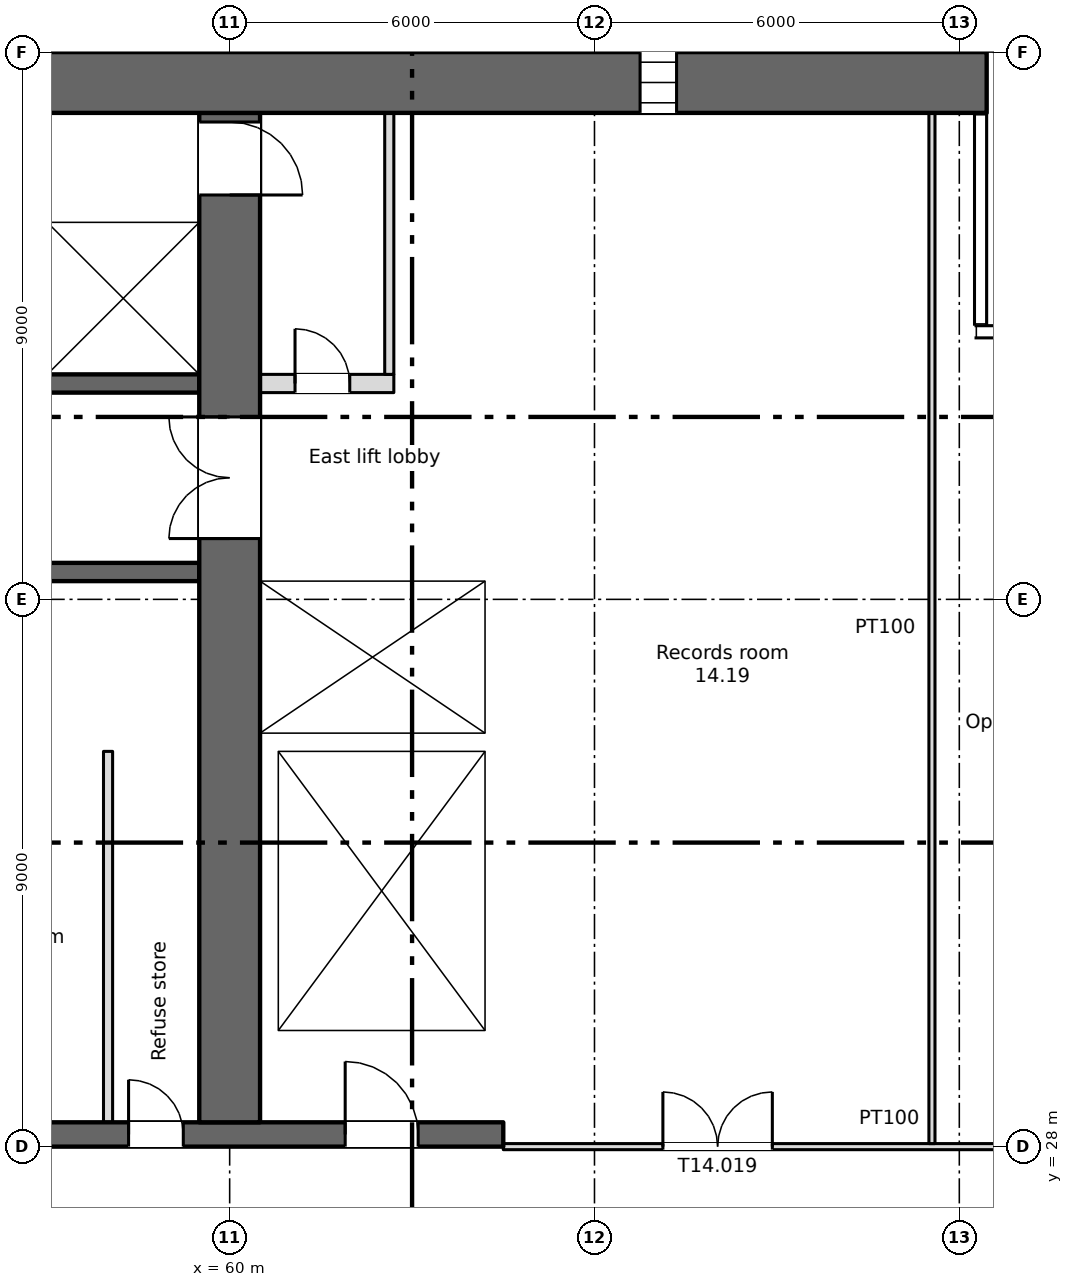
"""IFC4 building model, lengths in metres.
Left out: names, types, materials, properties, quantities, classifications, styles, units other than length and angle.
Written with IfcOpenShell. Run it as: python <this file> out.ifc"""

import sys

from ifc_helpers import new_model, si_unit, direction, frame, frame_2d, origin, place, context, subcontext, project, spatial, rectangle, extrude, element, fill, save


model = new_model("IFC4")
c1 = context("Model", 3, precision=1e-05, world=origin(), true_north=direction((0.0, 1.0)))
c2 = subcontext(c1, "Body", "Model", "MODEL_VIEW")
j1 = project(units=[si_unit("LENGTHUNIT", "METRE"), si_unit("PLANEANGLEUNIT", "RADIAN")], contexts=[c1])
p1 = place(None, origin())
s1 = spatial("IfcSite", under=j1, at=p1, CompositionType="ELEMENT")
p2 = place(p1, origin())
s2 = spatial("IfcBuilding", under=s1, at=p2, CompositionType="ELEMENT")
p3 = place(p2, frame((0.0, 0.0, 78.75)))
s3 = spatial("IfcBuildingStorey", under=s2, at=p3, CompositionType="ELEMENT", Elevation=78.75)
p4 = place(p3, frame((5.55, 45.5, 0.0), z_axis=(0.0, 0.0, 1.0), x_axis=(1.0, 0.0, 0.0)))
e1 = element("IfcWall", 1, at=p4, inside=s3, PredefinedType="SHEAR", context=c2, shape_type="SweptSolid", body=[
    extrude(rectangle(XDim=66.9, YDim=1.0, at=frame_2d((33.45, 0.0))), origin(), (0.0, 0.0, 1.0), 3.35),
])
p5 = place(p4, frame((7.2, 0.0, 0.6)))
e2 = element("IfcOpeningElement", 2, at=p5, cuts=e1, PredefinedType="OPENING", context=c2, shape_type="SweptSolid", body=[
    extrude(rectangle(XDim=0.6, YDim=2.4, at=frame_2d((0.3, 1.2))), frame((0.0, 0.51, 0.0), z_axis=(0.0, -1.0, 0.0), x_axis=(1.0, 0.0, 0.0)), (0.0, 0.0, 1.0), 1.02),
])
p6 = place(p4, frame((61.2, 0.0, 0.6)))
e3 = element("IfcOpeningElement", 3, at=p6, cuts=e1, PredefinedType="OPENING", context=c2, shape_type="SweptSolid", body=[
    extrude(rectangle(XDim=0.6, YDim=2.4, at=frame_2d((0.3, 1.2))), frame((0.0, 0.51, 0.0), z_axis=(0.0, -1.0, 0.0), x_axis=(1.0, 0.0, 0.0)), (0.0, 0.0, 1.0), 1.02),
])
p7 = place(p3, frame((6.7, 28.2, 0.0), z_axis=(0.0, 0.0, 1.0), x_axis=(1.0, 0.0, 0.0)))
e4 = element("IfcWall", 4, at=p7, inside=s3, PredefinedType="SHEAR", context=c2, shape_type="SweptSolid", body=[
    extrude(rectangle(XDim=57.8, YDim=0.4, at=frame_2d((28.9, 0.0))), origin(), (0.0, 0.0, 1.0), 3.35),
])
p8 = place(p7, frame((12.062, 0.0, 0.0)))
e5 = element("IfcOpeningElement", 5, at=p8, cuts=e4, PredefinedType="OPENING", context=c2, shape_type="SweptSolid", body=[
    extrude(rectangle(XDim=0.9, YDim=2.1, at=frame_2d((0.45, 1.05))), frame((0.0, 0.21, 0.0), z_axis=(0.0, -1.0, 0.0), x_axis=(1.0, 0.0, 0.0)), (0.0, 0.0, 1.0), 0.42),
])
p9 = place(p7, frame((14.637, 0.0, 0.0)))
e6 = element("IfcOpeningElement", 6, at=p9, cuts=e4, PredefinedType="OPENING", context=c2, shape_type="SweptSolid", body=[
    extrude(rectangle(XDim=0.9, YDim=2.1, at=frame_2d((0.45, 1.05))), frame((0.0, 0.21, 0.0), z_axis=(0.0, -1.0, 0.0), x_axis=(1.0, 0.0, 0.0)), (0.0, 0.0, 1.0), 0.42),
])
p10 = place(p7, frame((49.062, 0.0, 0.0)))
e7 = element("IfcOpeningElement", 7, at=p10, cuts=e4, PredefinedType="OPENING", context=c2, shape_type="SweptSolid", body=[
    extrude(rectangle(XDim=0.9, YDim=2.1, at=frame_2d((0.45, 1.05))), frame((0.0, 0.21, 0.0), z_axis=(0.0, -1.0, 0.0), x_axis=(1.0, 0.0, 0.0)), (0.0, 0.0, 1.0), 0.42),
])
p11 = place(p7, frame((51.637, 0.0, 0.0)))
e8 = element("IfcOpeningElement", 8, at=p11, cuts=e4, PredefinedType="OPENING", context=c2, shape_type="SweptSolid", body=[
    extrude(rectangle(XDim=0.9, YDim=2.1, at=frame_2d((0.45, 1.05))), frame((0.0, 0.21, 0.0), z_axis=(0.0, -1.0, 0.0), x_axis=(1.0, 0.0, 0.0)), (0.0, 0.0, 1.0), 0.42),
])
p12 = place(p7, frame((1.35, 0.0, 0.0)))
e9 = element("IfcOpeningElement", 9, at=p12, cuts=e4, PredefinedType="OPENING", context=c2, shape_type="SweptSolid", body=[
    extrude(rectangle(XDim=0.9, YDim=2.1, at=frame_2d((0.45, 1.05))), frame((0.0, 0.21, 0.0), z_axis=(0.0, -1.0, 0.0), x_axis=(1.0, 0.0, 0.0)), (0.0, 0.0, 1.0), 0.42),
])
p13 = place(p7, frame((4.7, 0.0, 0.0)))
e10 = element("IfcOpeningElement", 10, at=p13, cuts=e4, PredefinedType="OPENING", context=c2, shape_type="SweptSolid", body=[
    extrude(rectangle(XDim=1.2, YDim=2.1, at=frame_2d((0.6, 1.05))), frame((0.0, 0.21, 0.0), z_axis=(0.0, -1.0, 0.0), x_axis=(1.0, 0.0, 0.0)), (0.0, 0.0, 1.0), 0.42),
])
p14 = place(p7, frame((31.7, 0.0, 0.0)))
e11 = element("IfcOpeningElement", 11, at=p14, cuts=e4, PredefinedType="OPENING", context=c2, shape_type="SweptSolid", body=[
    extrude(rectangle(XDim=1.2, YDim=2.1, at=frame_2d((0.6, 1.05))), frame((0.0, 0.21, 0.0), z_axis=(0.0, -1.0, 0.0), x_axis=(1.0, 0.0, 0.0)), (0.0, 0.0, 1.0), 0.42),
])
p15 = place(p7, frame((55.2, 0.0, 0.0)))
e12 = element("IfcOpeningElement", 12, at=p15, cuts=e4, PredefinedType="OPENING", context=c2, shape_type="SweptSolid", body=[
    extrude(rectangle(XDim=1.2, YDim=2.1, at=frame_2d((0.6, 1.05))), frame((0.0, 0.21, 0.0), z_axis=(0.0, -1.0, 0.0), x_axis=(1.0, 0.0, 0.0)), (0.0, 0.0, 1.0), 0.42),
])
p16 = place(p7, frame((21.7, 0.0, 0.0)))
e13 = element("IfcOpeningElement", 13, at=p16, cuts=e4, PredefinedType="OPENING", context=c2, shape_type="SweptSolid", body=[
    extrude(rectangle(XDim=1.2, YDim=2.1, at=frame_2d((0.6, 1.05))), frame((0.0, 0.21, 0.0), z_axis=(0.0, -1.0, 0.0), x_axis=(1.0, 0.0, 0.0)), (0.0, 0.0, 1.0), 0.42),
])
p17 = place(p7, frame((41.7, 0.0, 0.0)))
e14 = element("IfcOpeningElement", 14, at=p17, cuts=e4, PredefinedType="OPENING", context=c2, shape_type="SweptSolid", body=[
    extrude(rectangle(XDim=1.2, YDim=2.1, at=frame_2d((0.6, 1.05))), frame((0.0, 0.21, 0.0), z_axis=(0.0, -1.0, 0.0), x_axis=(1.0, 0.0, 0.0)), (0.0, 0.0, 1.0), 0.42),
])
p18 = place(p7, frame((24.85, 0.0, 0.0)))
e15 = element("IfcOpeningElement", 15, at=p18, cuts=e4, PredefinedType="OPENING", context=c2, shape_type="SweptSolid", body=[
    extrude(rectangle(XDim=2.4, YDim=2.1, at=frame_2d((1.2, 1.05))), frame((0.0, 0.21, 0.0), z_axis=(0.0, -1.0, 0.0), x_axis=(1.0, 0.0, 0.0)), (0.0, 0.0, 1.0), 0.42),
])
p19 = place(p7, frame((37.35, 0.0, 0.0)))
e16 = element("IfcOpeningElement", 16, at=p19, cuts=e4, PredefinedType="OPENING", context=c2, shape_type="SweptSolid", body=[
    extrude(rectangle(XDim=2.4, YDim=2.1, at=frame_2d((1.2, 1.05))), frame((0.0, 0.21, 0.0), z_axis=(0.0, -1.0, 0.0), x_axis=(1.0, 0.0, 0.0)), (0.0, 0.0, 1.0), 0.42),
])
p20 = place(p7, frame((7.85, 0.0, 0.0)))
e17 = element("IfcOpeningElement", 17, at=p20, cuts=e4, PredefinedType="OPENING", context=c2, shape_type="SweptSolid", body=[
    extrude(rectangle(XDim=2.4, YDim=2.1, at=frame_2d((1.2, 1.05))), frame((0.0, 0.21, 0.0), z_axis=(0.0, -1.0, 0.0), x_axis=(1.0, 0.0, 0.0)), (0.0, 0.0, 1.0), 0.42),
])
p21 = place(p7, frame((28.85, 0.0, 0.0)))
e18 = element("IfcOpeningElement", 18, at=p21, cuts=e4, PredefinedType="OPENING", context=c2, shape_type="SweptSolid", body=[
    extrude(rectangle(XDim=0.9, YDim=2.1, at=frame_2d((0.45, 1.05))), frame((0.0, 0.21, 0.0), z_axis=(0.0, -1.0, 0.0), x_axis=(1.0, 0.0, 0.0)), (0.0, 0.0, 1.0), 0.42),
])
p22 = place(p7, frame((34.85, 0.0, 0.0)))
e19 = element("IfcOpeningElement", 19, at=p22, cuts=e4, PredefinedType="OPENING", context=c2, shape_type="SweptSolid", body=[
    extrude(rectangle(XDim=0.9, YDim=2.1, at=frame_2d((0.45, 1.05))), frame((0.0, 0.21, 0.0), z_axis=(0.0, -1.0, 0.0), x_axis=(1.0, 0.0, 0.0)), (0.0, 0.0, 1.0), 0.42),
])
p23 = place(p3, frame((64.35, 34.8, 0.0), z_axis=(0.0, 0.0, 1.0), x_axis=(0.0, 1.0, 0.0)))
e20 = element("IfcWall", 20, at=p23, inside=s3, PredefinedType="SHEAR", context=c2, shape_type="SweptSolid", body=[
    extrude(rectangle(XDim=10.2, YDim=0.3, at=frame_2d((5.1, 0.0))), origin(), (0.0, 0.0, 1.0), 3.35),
])
p24 = place(p3, frame((60.0, 28.4, 0.0), z_axis=(0.0, 0.0, 1.0), x_axis=(0.0, 1.0, 0.0)))
e21 = element("IfcWall", 21, at=p24, inside=s3, PredefinedType="SHEAR", context=c2, shape_type="SweptSolid", body=[
    extrude(rectangle(XDim=16.6, YDim=1.0, at=frame_2d((8.3, 0.0))), origin(), (0.0, 0.0, 1.0), 3.35),
])
p25 = place(p24, frame((9.6, 0.0, 0.0)))
e22 = element("IfcOpeningElement", 22, at=p25, cuts=e21, PredefinedType="OPENING", context=c2, shape_type="SweptSolid", body=[
    extrude(rectangle(XDim=2.0, YDim=2.1, at=frame_2d((1.0, 1.05))), frame((0.0, 0.51, 0.0), z_axis=(0.0, -1.0, 0.0), x_axis=(1.0, 0.0, 0.0)), (0.0, 0.0, 1.0), 1.02),
])
p26 = place(p24, frame((15.25, 0.0, 0.0)))
e23 = element("IfcOpeningElement", 23, at=p26, cuts=e21, PredefinedType="OPENING", context=c2, shape_type="SweptSolid", body=[
    extrude(rectangle(XDim=1.2, YDim=2.1, at=frame_2d((0.6, 1.05))), frame((0.0, 0.51, 0.0), z_axis=(0.0, -1.0, 0.0), x_axis=(1.0, 0.0, 0.0)), (0.0, 0.0, 1.0), 1.02),
])
for number, where, z_axis, x_axis in (
    (24, (60.65, 28.4, 0.0), (0.0, 0.0, 1.0), (0.0, 1.0, 0.0)),
    (25, (64.35, 28.4, 0.0), (0.0, 0.0, 1.0), (0.0, 1.0, 0.0)),
):
    element("IfcWall", number, at=place(p3, frame(where, z_axis=z_axis, x_axis=x_axis)), inside=s3, PredefinedType="SHEAR", context=c2, shape_type="SweptSolid", body=[
        extrude(rectangle(XDim=6.1, YDim=0.3, at=frame_2d((3.05, 0.0))), origin(), (0.0, 0.0, 1.0), 3.35),
    ])
p27 = place(p3, frame((47.3, 34.65, 0.0), z_axis=(0.0, 0.0, 1.0), x_axis=(1.0, 0.0, 0.0)))
e26 = element("IfcWall", 26, at=p27, inside=s3, PredefinedType="SHEAR", context=c2, shape_type="SweptSolid", body=[
    extrude(rectangle(XDim=12.2, YDim=0.3, at=frame_2d((6.1, 0.0))), origin(), (0.0, 0.0, 1.0), 3.35),
])
p28 = place(p27, frame((1.3, 0.0, 0.0)))
e27 = element("IfcOpeningElement", 27, at=p28, cuts=e26, PredefinedType="OPENING", context=c2, shape_type="SweptSolid", body=[
    extrude(rectangle(XDim=1.1, YDim=2.1, at=frame_2d((0.55, 1.05))), frame((0.0, 0.16, 0.0), z_axis=(0.0, -1.0, 0.0), x_axis=(1.0, 0.0, 0.0)), (0.0, 0.0, 1.0), 0.32),
])
p29 = place(p3, frame((60.5, 34.65, 0.0), z_axis=(0.0, 0.0, 1.0), x_axis=(1.0, 0.0, 0.0)))
e28 = element("IfcWall", 28, at=p29, inside=s3, PredefinedType="SHEAR", context=c2, shape_type="SweptSolid", body=[
    extrude(rectangle(XDim=4.0, YDim=0.3, at=frame_2d((2.0, 0.0))), origin(), (0.0, 0.0, 1.0), 3.35),
])
p30 = place(p3, frame((59.5, 37.45, 0.0), z_axis=(0.0, 0.0, 1.0), x_axis=(-1.0, 0.0, 0.0)))
e29 = element("IfcWall", 29, at=p30, inside=s3, PredefinedType="SHEAR", context=c2, shape_type="SweptSolid", body=[
    extrude(rectangle(XDim=12.2, YDim=0.3, at=frame_2d((6.1, 0.0))), origin(), (0.0, 0.0, 1.0), 3.35),
])
p31 = place(p30, frame((3.9, 0.0, 0.0)))
e30 = element("IfcOpeningElement", 30, at=p31, cuts=e29, PredefinedType="OPENING", context=c2, shape_type="SweptSolid", body=[
    extrude(rectangle(XDim=0.9, YDim=2.1, at=frame_2d((0.45, 1.05))), frame((0.0, 0.16, 0.0), z_axis=(0.0, -1.0, 0.0), x_axis=(1.0, 0.0, 0.0)), (0.0, 0.0, 1.0), 0.32),
])
p32 = place(p3, frame((60.5, 37.45, 0.0), z_axis=(0.0, 0.0, 1.0), x_axis=(1.0, 0.0, 0.0)))
e31 = element("IfcWall", 31, at=p32, inside=s3, PredefinedType="SHEAR", context=c2, shape_type="SweptSolid", body=[
    extrude(rectangle(XDim=3.7, YDim=0.3, at=frame_2d((1.85, 0.0))), origin(), (0.0, 0.0, 1.0), 3.35),
])
p33 = place(p32, frame((1.3, 0.0, 0.0)))
e32 = element("IfcOpeningElement", 32, at=p33, cuts=e31, PredefinedType="OPENING", context=c2, shape_type="SweptSolid", body=[
    extrude(rectangle(XDim=1.1, YDim=2.1, at=frame_2d((0.55, 1.05))), frame((0.0, 0.16, 0.0), z_axis=(0.0, -1.0, 0.0), x_axis=(1.0, 0.0, 0.0)), (0.0, 0.0, 1.0), 0.32),
])
p34 = place(p3, frame((18.5, 40.55, 0.0), z_axis=(0.0, 0.0, 1.0), x_axis=(1.0, 0.0, 0.0)))
e33 = element("IfcWall", 33, at=p34, inside=s3, PredefinedType="SHEAR", context=c2, shape_type="SweptSolid", body=[
    extrude(rectangle(XDim=41.0, YDim=0.3, at=frame_2d((20.5, 0.0))), origin(), (0.0, 0.0, 1.0), 3.35),
])
p35 = place(p34, frame((9.025, 0.0, 0.0)))
e34 = element("IfcOpeningElement", 34, at=p35, cuts=e33, PredefinedType="OPENING", context=c2, shape_type="SweptSolid", body=[
    extrude(rectangle(XDim=0.9, YDim=2.1, at=frame_2d((0.45, 1.05))), frame((0.0, 0.16, 0.0), z_axis=(0.0, -1.0, 0.0), x_axis=(1.0, 0.0, 0.0)), (0.0, 0.0, 1.0), 0.32),
])
p36 = place(p34, frame((32.4, 0.0, 0.0)))
e35 = element("IfcOpeningElement", 35, at=p36, cuts=e33, PredefinedType="OPENING", context=c2, shape_type="SweptSolid", body=[
    extrude(rectangle(XDim=0.9, YDim=2.1, at=frame_2d((0.45, 1.05))), frame((0.0, 0.16, 0.0), z_axis=(0.0, -1.0, 0.0), x_axis=(1.0, 0.0, 0.0)), (0.0, 0.0, 1.0), 0.32),
])
p37 = place(p34, frame((14.425, 0.0, 0.0)))
e36 = element("IfcOpeningElement", 36, at=p37, cuts=e33, PredefinedType="OPENING", context=c2, shape_type="SweptSolid", body=[
    extrude(rectangle(XDim=1.1, YDim=2.1, at=frame_2d((0.55, 1.05))), frame((0.0, 0.16, 0.0), z_axis=(0.0, -1.0, 0.0), x_axis=(1.0, 0.0, 0.0)), (0.0, 0.0, 1.0), 0.32),
])
p38 = place(p34, frame((17.175, 0.0, 0.0)))
e37 = element("IfcOpeningElement", 37, at=p38, cuts=e33, PredefinedType="OPENING", context=c2, shape_type="SweptSolid", body=[
    extrude(rectangle(XDim=1.1, YDim=2.1, at=frame_2d((0.55, 1.05))), frame((0.0, 0.16, 0.0), z_axis=(0.0, -1.0, 0.0), x_axis=(1.0, 0.0, 0.0)), (0.0, 0.0, 1.0), 0.32),
])
p39 = place(p34, frame((19.925, 0.0, 0.0)))
e38 = element("IfcOpeningElement", 38, at=p39, cuts=e33, PredefinedType="OPENING", context=c2, shape_type="SweptSolid", body=[
    extrude(rectangle(XDim=1.1, YDim=2.1, at=frame_2d((0.55, 1.05))), frame((0.0, 0.16, 0.0), z_axis=(0.0, -1.0, 0.0), x_axis=(1.0, 0.0, 0.0)), (0.0, 0.0, 1.0), 0.32),
])
p40 = place(p34, frame((22.675, 0.0, 0.0)))
e39 = element("IfcOpeningElement", 39, at=p40, cuts=e33, PredefinedType="OPENING", context=c2, shape_type="SweptSolid", body=[
    extrude(rectangle(XDim=1.1, YDim=2.1, at=frame_2d((0.55, 1.05))), frame((0.0, 0.16, 0.0), z_axis=(0.0, -1.0, 0.0), x_axis=(1.0, 0.0, 0.0)), (0.0, 0.0, 1.0), 0.32),
])
p41 = place(p34, frame((36.375, 0.0, 0.0)))
e40 = element("IfcOpeningElement", 40, at=p41, cuts=e33, PredefinedType="OPENING", context=c2, shape_type="SweptSolid", body=[
    extrude(rectangle(XDim=1.2, YDim=2.1, at=frame_2d((0.6, 1.05))), frame((0.0, 0.16, 0.0), z_axis=(0.0, -1.0, 0.0), x_axis=(1.0, 0.0, 0.0)), (0.0, 0.0, 1.0), 0.32),
])
p42 = place(p34, frame((39.15, 0.0, 0.0)))
e41 = element("IfcOpeningElement", 41, at=p42, cuts=e33, PredefinedType="OPENING", context=c2, shape_type="SweptSolid", body=[
    extrude(rectangle(XDim=1.2, YDim=2.1, at=frame_2d((0.6, 1.05))), frame((0.0, 0.16, 0.0), z_axis=(0.0, -1.0, 0.0), x_axis=(1.0, 0.0, 0.0)), (0.0, 0.0, 1.0), 0.32),
])
p43 = place(p3, frame((18.5, 43.35, 0.0), z_axis=(0.0, 0.0, 1.0), x_axis=(1.0, 0.0, 0.0)))
e42 = element("IfcWall", 42, at=p43, inside=s3, PredefinedType="SHEAR", context=c2, shape_type="SweptSolid", body=[
    extrude(rectangle(XDim=41.0, YDim=0.3, at=frame_2d((20.5, 0.0))), origin(), (0.0, 0.0, 1.0), 3.35),
])
p44 = place(p3, frame((60.5, 40.55, 0.0), z_axis=(0.0, 0.0, 1.0), x_axis=(1.0, 0.0, 0.0)))
e43 = element("IfcWall", 43, at=p44, inside=s3, PredefinedType="PARTITIONING", context=c2, shape_type="SweptSolid", body=[
    extrude(rectangle(XDim=2.2, YDim=0.3, at=frame_2d((1.1, 0.0))), origin(), (0.0, 0.0, 1.0), 3.35),
])
p45 = place(p44, frame((0.575, 0.0, 0.0)))
e44 = element("IfcOpeningElement", 44, at=p45, cuts=e43, PredefinedType="OPENING", context=c2, shape_type="SweptSolid", body=[
    extrude(rectangle(XDim=0.9, YDim=2.1, at=frame_2d((0.45, 1.05))), frame((0.0, 0.16, 0.0), z_axis=(0.0, -1.0, 0.0), x_axis=(1.0, 0.0, 0.0)), (0.0, 0.0, 1.0), 0.32),
])
p46 = place(p3, frame((62.625, 40.7, 0.0), z_axis=(0.0, 0.0, 1.0), x_axis=(0.0, 1.0, 0.0)))
e45 = element("IfcWall", 45, at=p46, inside=s3, PredefinedType="PARTITIONING", context=c2, shape_type="SweptSolid", body=[
    extrude(rectangle(XDim=4.3, YDim=0.15, at=frame_2d((2.15, 0.0))), origin(), (0.0, 0.0, 1.0), 3.35),
])
p47 = place(p3, frame((58.0, 28.4, 0.0), z_axis=(0.0, 0.0, 1.0), x_axis=(0.0, 1.0, 0.0)))
e46 = element("IfcWall", 46, at=p47, inside=s3, PredefinedType="PARTITIONING", context=c2, shape_type="SweptSolid", body=[
    extrude(rectangle(XDim=6.1, YDim=0.15, at=frame_2d((3.05, 0.0))), origin(), (0.0, 0.0, 1.0), 3.35),
])
p48 = place(p3, frame((64.5, 28.0, 0.0), z_axis=(0.0, 0.0, 1.0), x_axis=(1.0, 0.0, 0.0)))
e47 = element("IfcWall", 47, at=p48, inside=s3, PredefinedType="PARTITIONING", context=c2, shape_type="SweptSolid", body=[
    extrude(rectangle(XDim=12.7, YDim=0.1, at=frame_2d((6.35, 0.0))), origin(), (0.0, 0.0, 1.0), 3.35),
])
p49 = place(p48, frame((8.975, 0.0, 0.0)))
e48 = element("IfcOpeningElement", 48, at=p49, cuts=e47, PredefinedType="OPENING", context=c2, shape_type="SweptSolid", body=[
    extrude(rectangle(XDim=1.8, YDim=2.1, at=frame_2d((0.9, 1.05))), frame((0.0, 0.06, 0.0), z_axis=(0.0, -1.0, 0.0), x_axis=(1.0, 0.0, 0.0)), (0.0, 0.0, 1.0), 0.12),
])
p50 = place(p48, frame((2.625, 0.0, 0.0)))
e49 = element("IfcOpeningElement", 49, at=p50, cuts=e47, PredefinedType="OPENING", context=c2, shape_type="SweptSolid", body=[
    extrude(rectangle(XDim=1.8, YDim=2.1, at=frame_2d((0.9, 1.05))), frame((0.0, 0.06, 0.0), z_axis=(0.0, -1.0, 0.0), x_axis=(1.0, 0.0, 0.0)), (0.0, 0.0, 1.0), 0.12),
])
p51 = place(p3, frame((71.55, 28.05, 0.0), z_axis=(0.0, 0.0, 1.0), x_axis=(0.0, 1.0, 0.0)))
e50 = element("IfcWall", 50, at=p51, inside=s3, PredefinedType="PARTITIONING", context=c2, shape_type="SweptSolid", body=[
    extrude(rectangle(XDim=16.95, YDim=0.1, at=frame_2d((8.475, 0.0))), origin(), (0.0, 0.0, 1.0), 3.35),
])
p52 = place(p6, origin())
e51 = element("IfcWindow", 51, at=p52, inside=s3, PartitioningType="SINGLE_PANEL", PredefinedType="WINDOW", context=c2, shape_type="SweptSolid", body=[
    extrude(rectangle(XDim=0.6, YDim=2.4, at=frame_2d((0.3, 1.2))), frame((0.0, 0.03, 0.0), z_axis=(0.0, -1.0, 0.0), x_axis=(1.0, 0.0, 0.0)), (0.0, 0.0, 1.0), 0.06),
])
fill(e3, e51)
p53 = place(p11, origin())
e52 = element("IfcDoor", 52, at=p53, inside=s3, OperationType="SINGLE_SWING_LEFT", PredefinedType="DOOR", context=c2, shape_type="SweptSolid", body=[
    extrude(rectangle(XDim=0.9, YDim=2.1, at=frame_2d((0.45, 1.05))), frame((0.0, 0.025, 0.0), z_axis=(0.0, -1.0, 0.0), x_axis=(1.0, 0.0, 0.0)), (0.0, 0.0, 1.0), 0.05),
])
fill(e8, e52)
p54 = place(p45, origin())
e53 = element("IfcDoor", 53, at=p54, inside=s3, OperationType="SINGLE_SWING_LEFT", PredefinedType="DOOR", context=c2, shape_type="SweptSolid", body=[
    extrude(rectangle(XDim=0.9, YDim=2.1, at=frame_2d((0.45, 1.05))), frame((0.0, 0.025, 0.0), z_axis=(0.0, -1.0, 0.0), x_axis=(1.0, 0.0, 0.0)), (0.0, 0.0, 1.0), 0.05),
])
fill(e44, e53)
p55 = place(p42, origin())
e54 = element("IfcDoor", 54, at=p55, inside=s3, OperationType="SLIDING_TO_LEFT", PredefinedType="DOOR", context=c2, shape_type="SweptSolid", body=[
    extrude(rectangle(XDim=1.2, YDim=2.1, at=frame_2d((0.6, 1.05))), frame((0.0, 0.025, 0.0), z_axis=(0.0, -1.0, 0.0), x_axis=(1.0, 0.0, 0.0)), (0.0, 0.0, 1.0), 0.05),
])
fill(e41, e54)
p56 = place(p33, origin())
e55 = element("IfcDoor", 55, at=p56, inside=s3, OperationType="SLIDING_TO_LEFT", PredefinedType="DOOR", context=c2, shape_type="SweptSolid", body=[
    extrude(rectangle(XDim=1.1, YDim=2.1, at=frame_2d((0.55, 1.05))), frame((0.0, 0.025, 0.0), z_axis=(0.0, -1.0, 0.0), x_axis=(1.0, 0.0, 0.0)), (0.0, 0.0, 1.0), 0.05),
])
fill(e32, e55)
p57 = place(p15, origin())
e56 = element("IfcDoor", 56, at=p57, inside=s3, OperationType="SINGLE_SWING_LEFT", PredefinedType="DOOR", context=c2, shape_type="SweptSolid", body=[
    extrude(rectangle(XDim=1.2, YDim=2.1, at=frame_2d((0.6, 1.05))), frame((0.0, 0.025, 0.0), z_axis=(0.0, -1.0, 0.0), x_axis=(1.0, 0.0, 0.0)), (0.0, 0.0, 1.0), 0.05),
])
fill(e12, e56)
p58 = place(p25, origin())
e57 = element("IfcDoor", 57, at=p58, inside=s3, OperationType="DOUBLE_DOOR_SINGLE_SWING", PredefinedType="DOOR", context=c2, shape_type="SweptSolid", body=[
    extrude(rectangle(XDim=2.0, YDim=2.1, at=frame_2d((1.0, 1.05))), frame((0.0, 0.025, 0.0), z_axis=(0.0, -1.0, 0.0), x_axis=(1.0, 0.0, 0.0)), (0.0, 0.0, 1.0), 0.05),
])
fill(e22, e57)
p59 = place(p26, origin())
e58 = element("IfcDoor", 58, at=p59, inside=s3, OperationType="SINGLE_SWING_LEFT", PredefinedType="DOOR", context=c2, shape_type="SweptSolid", body=[
    extrude(rectangle(XDim=1.2, YDim=2.1, at=frame_2d((0.6, 1.05))), frame((0.0, 0.025, 0.0), z_axis=(0.0, -1.0, 0.0), x_axis=(1.0, 0.0, 0.0)), (0.0, 0.0, 1.0), 0.05),
])
fill(e23, e58)
p60 = place(p50, origin())
e59 = element("IfcDoor", 59, at=p60, inside=s3, OperationType="DOUBLE_DOOR_SINGLE_SWING", PredefinedType="DOOR", context=c2, shape_type="SweptSolid", body=[
    extrude(rectangle(XDim=1.8, YDim=2.1, at=frame_2d((0.9, 1.05))), frame((0.0, 0.025, 0.0), z_axis=(0.0, -1.0, 0.0), x_axis=(1.0, 0.0, 0.0)), (0.0, 0.0, 1.0), 0.05),
])
fill(e49, e59)
save(model, sys.argv[1])
